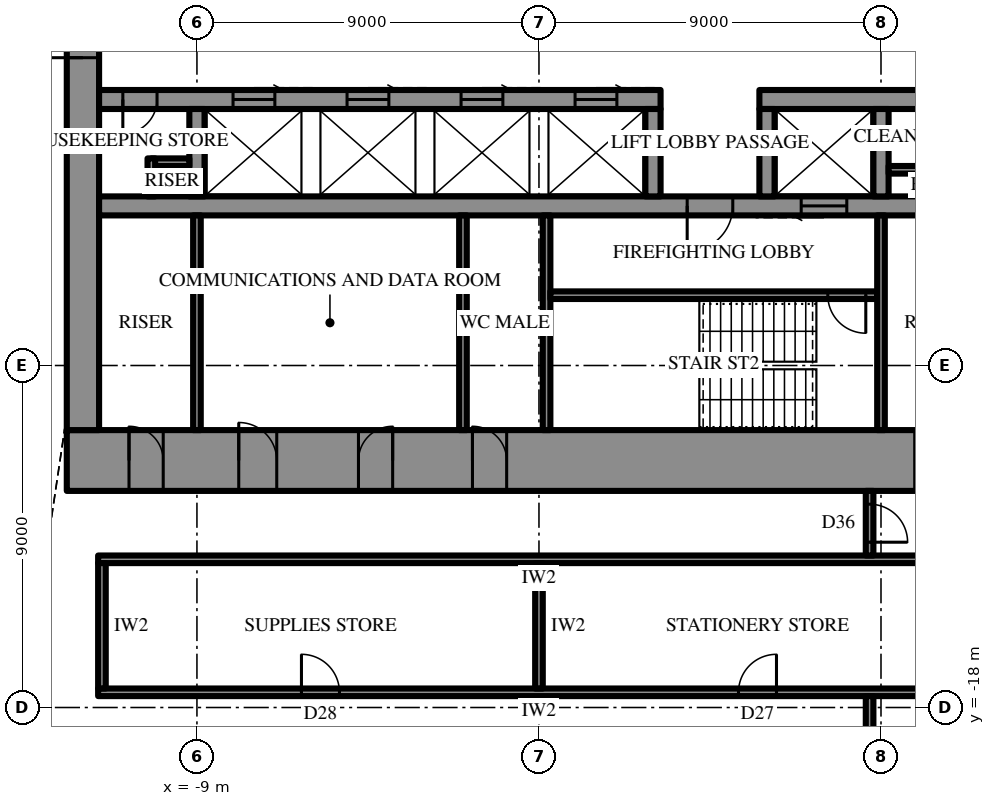
"""IFC4 building model, lengths in metres.
Left out: names, types, materials, properties, quantities, classifications, styles, units other than length and angle.
Written with IfcOpenShell. Run it as: python <this file> out.ifc"""

import sys

from ifc_helpers import new_model, si_unit, direction, frame, frame_2d, origin, place, context, subcontext, project, spatial, rectangle, extrude, element, fill, save


model = new_model("IFC4")
c1 = context("Model", 3, precision=1e-05, world=origin(), true_north=direction((0.0, 1.0)))
c2 = subcontext(c1, "Body", "Model", "MODEL_VIEW")
j1 = project(units=[si_unit("LENGTHUNIT", "METRE"), si_unit("PLANEANGLEUNIT", "RADIAN")], contexts=[c1])
p1 = place(None, origin())
s1 = spatial("IfcSite", under=j1, at=p1, CompositionType="ELEMENT")
p2 = place(p1, origin())
s2 = spatial("IfcBuilding", under=s1, at=p2, CompositionType="ELEMENT")
p3 = place(p2, frame((0.0, 0.0, 340.9)))
s3 = spatial("IfcBuildingStorey", under=s2, at=p3, CompositionType="ELEMENT", Elevation=340.9)
p4 = place(p3, frame((12.425, -11.5, 0.0), z_axis=(0.0, 0.0, 1.0), x_axis=(-1.0, 0.0, 0.0)))
e1 = element("IfcWall", 1, at=p4, inside=s3, PredefinedType="SHEAR", context=c2, shape_type="SweptSolid", body=[
    extrude(rectangle(XDim=24.85, YDim=1.6, at=frame_2d((12.425, 0.0))), origin(), (0.0, 0.0, 1.0), 4.2),
])
p5 = place(p4, frame((13.275, 0.0, 0.0)))
e2 = element("IfcOpeningElement", 2, at=p5, cuts=e1, PredefinedType="OPENING", context=c2, shape_type="SweptSolid", body=[
    extrude(rectangle(XDim=0.9, YDim=2.2, at=frame_2d((0.45, 1.1))), frame((0.0, 0.81, 0.0), z_axis=(0.0, -1.0, 0.0), x_axis=(1.0, 0.0, 0.0)), (0.0, 0.0, 1.0), 1.62),
])
p6 = place(p4, frame((16.275, 0.0, 0.0)))
e3 = element("IfcOpeningElement", 3, at=p6, cuts=e1, PredefinedType="OPENING", context=c2, shape_type="SweptSolid", body=[
    extrude(rectangle(XDim=0.9, YDim=2.2, at=frame_2d((0.45, 1.1))), frame((0.0, 0.81, 0.0), z_axis=(0.0, -1.0, 0.0), x_axis=(1.0, 0.0, 0.0)), (0.0, 0.0, 1.0), 1.62),
])
p7 = place(p4, frame((19.325, 0.0, 0.0)))
e4 = element("IfcOpeningElement", 4, at=p7, cuts=e1, PredefinedType="OPENING", context=c2, shape_type="SweptSolid", body=[
    extrude(rectangle(XDim=1.0, YDim=2.2, at=frame_2d((0.5, 1.1))), frame((0.0, 0.81, 0.0), z_axis=(0.0, -1.0, 0.0), x_axis=(1.0, 0.0, 0.0)), (0.0, 0.0, 1.0), 1.62),
])
p8 = place(p4, frame((1.637, 0.0, 0.0)))
e5 = element("IfcOpeningElement", 5, at=p8, cuts=e1, PredefinedType="OPENING", context=c2, shape_type="SweptSolid", body=[
    extrude(rectangle(XDim=0.9, YDim=2.2, at=frame_2d((0.45, 1.1))), frame((0.0, 0.81, 0.0), z_axis=(0.0, -1.0, 0.0), x_axis=(1.0, 0.0, 0.0)), (0.0, 0.0, 1.0), 1.62),
])
p9 = place(p4, frame((22.312, 0.0, 0.0)))
e6 = element("IfcOpeningElement", 6, at=p9, cuts=e1, PredefinedType="OPENING", context=c2, shape_type="SweptSolid", body=[
    extrude(rectangle(XDim=0.9, YDim=2.2, at=frame_2d((0.45, 1.1))), frame((0.0, 0.81, 0.0), z_axis=(0.0, -1.0, 0.0), x_axis=(1.0, 0.0, 0.0)), (0.0, 0.0, 1.0), 1.62),
])
p10 = place(p3, frame((-12.0, 10.7, 0.0), z_axis=(0.0, 0.0, 1.0), x_axis=(0.0, -1.0, 0.0)))
e7 = element("IfcWall", 7, at=p10, inside=s3, PredefinedType="SHEAR", context=c2, shape_type="SweptSolid", body=[
    extrude(rectangle(XDim=21.4, YDim=0.85, at=frame_2d((10.7, 0.0))), origin(), (0.0, 0.0, 1.0), 4.2),
])
p11 = place(p10, frame((9.8, 0.0, 0.0)))
e8 = element("IfcOpeningElement", 8, at=p11, cuts=e7, PredefinedType="OPENING", context=c2, shape_type="SweptSolid", body=[
    extrude(rectangle(XDim=1.8, YDim=2.4, at=frame_2d((0.9, 1.2))), frame((0.0, 0.435, 0.0), z_axis=(0.0, -1.0, 0.0), x_axis=(1.0, 0.0, 0.0)), (0.0, 0.0, 1.0), 0.87),
])
p12 = place(p3, frame((11.575, -2.0, 0.0), z_axis=(0.0, 0.0, 1.0), x_axis=(-1.0, 0.0, 0.0)))
e9 = element("IfcWall", 9, at=p12, inside=s3, PredefinedType="SHEAR", context=c2, shape_type="SweptSolid", body=[
    extrude(rectangle(XDim=5.775, YDim=0.5, at=frame_2d((2.887, 0.0))), origin(), (0.0, 0.0, 1.0), 4.2),
])
p13 = place(p12, frame((0.625, 0.0, 0.0)))
e10 = element("IfcOpeningElement", 10, at=p13, cuts=e9, PredefinedType="OPENING", context=c2, shape_type="SweptSolid", body=[
    extrude(rectangle(XDim=0.9, YDim=2.2, at=frame_2d((0.45, 1.1))), frame((0.0, 0.26, 0.0), z_axis=(0.0, -1.0, 0.0), x_axis=(1.0, 0.0, 0.0)), (0.0, 0.0, 1.0), 0.52),
])
p14 = place(p3, frame((3.2, -2.0, 0.0), z_axis=(0.0, 0.0, 1.0), x_axis=(-1.0, 0.0, 0.0)))
e11 = element("IfcWall", 11, at=p14, inside=s3, PredefinedType="SHEAR", context=c2, shape_type="SweptSolid", body=[
    extrude(rectangle(XDim=14.775, YDim=0.5, at=frame_2d((7.387, 0.0))), origin(), (0.0, 0.0, 1.0), 4.2),
])
p15 = place(p14, frame((13.25, 0.0, 0.0)))
e12 = element("IfcOpeningElement", 12, at=p15, cuts=e11, PredefinedType="OPENING", context=c2, shape_type="SweptSolid", body=[
    extrude(rectangle(XDim=0.9, YDim=2.2, at=frame_2d((0.45, 1.1))), frame((0.0, 0.26, 0.0), z_axis=(0.0, -1.0, 0.0), x_axis=(1.0, 0.0, 0.0)), (0.0, 0.0, 1.0), 0.52),
])
p16 = place(p14, frame((1.15, 0.0, 0.0)))
e13 = element("IfcOpeningElement", 13, at=p16, cuts=e11, PredefinedType="OPENING", context=c2, shape_type="SweptSolid", body=[
    extrude(rectangle(XDim=1.1, YDim=2.2, at=frame_2d((0.55, 1.1))), frame((0.0, 0.26, 0.0), z_axis=(0.0, -1.0, 0.0), x_axis=(1.0, 0.0, 0.0)), (0.0, 0.0, 1.0), 0.52),
])
p17 = place(p14, frame((4.15, 0.0, 0.0)))
e14 = element("IfcOpeningElement", 14, at=p17, cuts=e11, PredefinedType="OPENING", context=c2, shape_type="SweptSolid", body=[
    extrude(rectangle(XDim=1.1, YDim=2.2, at=frame_2d((0.55, 1.1))), frame((0.0, 0.26, 0.0), z_axis=(0.0, -1.0, 0.0), x_axis=(1.0, 0.0, 0.0)), (0.0, 0.0, 1.0), 0.52),
])
p18 = place(p14, frame((7.15, 0.0, 0.0)))
e15 = element("IfcOpeningElement", 15, at=p18, cuts=e11, PredefinedType="OPENING", context=c2, shape_type="SweptSolid", body=[
    extrude(rectangle(XDim=1.1, YDim=2.2, at=frame_2d((0.55, 1.1))), frame((0.0, 0.26, 0.0), z_axis=(0.0, -1.0, 0.0), x_axis=(1.0, 0.0, 0.0)), (0.0, 0.0, 1.0), 0.52),
])
p19 = place(p14, frame((10.15, 0.0, 0.0)))
e16 = element("IfcOpeningElement", 16, at=p19, cuts=e11, PredefinedType="OPENING", context=c2, shape_type="SweptSolid", body=[
    extrude(rectangle(XDim=1.1, YDim=2.2, at=frame_2d((0.55, 1.1))), frame((0.0, 0.26, 0.0), z_axis=(0.0, -1.0, 0.0), x_axis=(1.0, 0.0, 0.0)), (0.0, 0.0, 1.0), 0.52),
])
p20 = place(p3, frame((11.575, -4.8, 0.0), z_axis=(0.0, 0.0, 1.0), x_axis=(-1.0, 0.0, 0.0)))
e17 = element("IfcWall", 17, at=p20, inside=s3, PredefinedType="SHEAR", context=c2, shape_type="SweptSolid", body=[
    extrude(rectangle(XDim=23.15, YDim=0.5, at=frame_2d((11.575, 0.0))), origin(), (0.0, 0.0, 1.0), 4.2),
])
p21 = place(p20, frame((6.475, 0.0, 0.0)))
e18 = element("IfcOpeningElement", 18, at=p21, cuts=e17, PredefinedType="OPENING", context=c2, shape_type="SweptSolid", body=[
    extrude(rectangle(XDim=1.2, YDim=2.2, at=frame_2d((0.6, 1.1))), frame((0.0, 0.26, 0.0), z_axis=(0.0, -1.0, 0.0), x_axis=(1.0, 0.0, 0.0)), (0.0, 0.0, 1.0), 0.52),
])
p22 = place(p20, frame((3.475, 0.0, 0.0)))
e19 = element("IfcOpeningElement", 19, at=p22, cuts=e17, PredefinedType="OPENING", context=c2, shape_type="SweptSolid", body=[
    extrude(rectangle(XDim=1.2, YDim=2.2, at=frame_2d((0.6, 1.1))), frame((0.0, 0.26, 0.0), z_axis=(0.0, -1.0, 0.0), x_axis=(1.0, 0.0, 0.0)), (0.0, 0.0, 1.0), 0.52),
])
for number, where, z_axis, x_axis in (
    (20, (9.0, -2.25, 0.0), (0.0, 0.0, 1.0), (0.0, -1.0, 0.0)),
    (21, (6.0, -2.25, 0.0), (0.0, 0.0, 1.0), (0.0, -1.0, 0.0)),
    (22, (3.0, -2.25, 0.0), (0.0, 0.0, 1.0), (0.0, -1.0, 0.0)),
    (23, (-9.0, -2.25, 0.0), (0.0, 0.0, 1.0), (0.0, -1.0, 0.0)),
):
    element("IfcWall", number, at=place(p3, frame(where, z_axis=z_axis, x_axis=x_axis)), inside=s3, PredefinedType="SHEAR", context=c2, shape_type="SweptSolid", body=[
        extrude(rectangle(XDim=2.3, YDim=0.4, at=frame_2d((1.15, 0.0))), origin(), (0.0, 0.0, 1.0), 4.2),
    ])
p23 = place(p3, frame((0.2, -5.05, 0.0), z_axis=(0.0, 0.0, 1.0), x_axis=(0.0, -1.0, 0.0)))
e24 = element("IfcWall", 24, at=p23, inside=s3, PredefinedType="SHEAR", context=c2, shape_type="SweptSolid", body=[
    extrude(rectangle(XDim=5.65, YDim=0.2, at=frame_2d((2.825, 0.0))), origin(), (0.0, 0.0, 1.0), 4.2),
])
p24 = place(p3, frame((8.9, -7.15, 0.0), z_axis=(0.0, 0.0, 1.0), x_axis=(-1.0, 0.0, 0.0)))
e25 = element("IfcWall", 25, at=p24, inside=s3, PredefinedType="SHEAR", context=c2, shape_type="SweptSolid", body=[
    extrude(rectangle(XDim=8.6, YDim=0.2, at=frame_2d((4.3, 0.0))), origin(), (0.0, 0.0, 1.0), 4.2),
])
p25 = place(p24, frame((0.3, 0.0, 0.0)))
e26 = element("IfcOpeningElement", 26, at=p25, cuts=e25, PredefinedType="OPENING", context=c2, shape_type="SweptSolid", body=[
    extrude(rectangle(XDim=1.0, YDim=2.2, at=frame_2d((0.5, 1.1))), frame((0.0, 0.11, 0.0), z_axis=(0.0, -1.0, 0.0), x_axis=(1.0, 0.0, 0.0)), (0.0, 0.0, 1.0), 0.22),
])
for number, where, z_axis, x_axis in (
    (27, (9.0, -5.05, 0.0), (0.0, 0.0, 1.0), (0.0, -1.0, 0.0)),
    (28, (-9.0, -5.05, 0.0), (0.0, 0.0, 1.0), (0.0, -1.0, 0.0)),
    (29, (-2.0, -5.05, 0.0), (0.0, 0.0, 1.0), (0.0, -1.0, 0.0)),
):
    element("IfcWall", number, at=place(p3, frame(where, z_axis=z_axis, x_axis=x_axis)), inside=s3, PredefinedType="PARTITIONING", context=c2, shape_type="SweptSolid", body=[
        extrude(rectangle(XDim=5.65, YDim=0.2, at=frame_2d((2.825, 0.0))), origin(), (0.0, 0.0, 1.0), 4.0),
    ])
p26 = place(p3, frame((11.8, -3.85, 0.0), z_axis=(0.0, 0.0, 1.0), x_axis=(-1.0, 0.0, 0.0)))
e30 = element("IfcWall", 30, at=p26, inside=s3, PredefinedType="PARTITIONING", context=c2, shape_type="SweptSolid", body=[
    extrude(rectangle(XDim=2.6, YDim=0.2, at=frame_2d((1.3, 0.0))), origin(), (0.0, 0.0, 1.0), 4.0),
])
for number, where, z_axis, x_axis in (
    (31, (-9.2, -3.65, 0.0), (0.0, 0.0, 1.0), (-1.0, 0.0, 0.0)),
    (32, (-10.2, -3.55, 0.0), (0.0, 0.0, 1.0), (0.0, -1.0, 0.0)),
):
    element("IfcWall", number, at=place(p3, frame(where, z_axis=z_axis, x_axis=x_axis)), inside=s3, PredefinedType="PARTITIONING", context=c2, shape_type="SweptSolid", body=[
        extrude(rectangle(XDim=1.0, YDim=0.2, at=frame_2d((0.5, 0.0))), origin(), (0.0, 0.0, 1.0), 4.0),
    ])
p27 = place(p3, frame((11.6, -14.1, 0.0), z_axis=(0.0, 0.0, 1.0), x_axis=(-1.0, 0.0, 0.0)))
e33 = element("IfcWall", 33, at=p27, inside=s3, PredefinedType="PARTITIONING", context=c2, shape_type="SweptSolid", body=[
    extrude(rectangle(XDim=23.2, YDim=0.2, at=frame_2d((11.6, 0.0))), origin(), (0.0, 0.0, 1.0), 4.0),
])
p28 = place(p3, frame((11.6, -17.6, 0.0), z_axis=(0.0, 0.0, 1.0), x_axis=(-1.0, 0.0, 0.0)))
e34 = element("IfcWall", 34, at=p28, inside=s3, PredefinedType="PARTITIONING", context=c2, shape_type="SweptSolid", body=[
    extrude(rectangle(XDim=23.2, YDim=0.2, at=frame_2d((11.6, 0.0))), origin(), (0.0, 0.0, 1.0), 4.0),
])
p29 = place(p28, frame((5.35, 0.0, 0.0)))
e35 = element("IfcOpeningElement", 35, at=p29, cuts=e34, PredefinedType="OPENING", context=c2, shape_type="SweptSolid", body=[
    extrude(rectangle(XDim=1.0, YDim=2.2, at=frame_2d((0.5, 1.1))), frame((0.0, 0.11, 0.0), z_axis=(0.0, -1.0, 0.0), x_axis=(1.0, 0.0, 0.0)), (0.0, 0.0, 1.0), 0.22),
])
p30 = place(p28, frame((16.85, 0.0, 0.0)))
e36 = element("IfcOpeningElement", 36, at=p30, cuts=e34, PredefinedType="OPENING", context=c2, shape_type="SweptSolid", body=[
    extrude(rectangle(XDim=1.0, YDim=2.2, at=frame_2d((0.5, 1.1))), frame((0.0, 0.11, 0.0), z_axis=(0.0, -1.0, 0.0), x_axis=(1.0, 0.0, 0.0)), (0.0, 0.0, 1.0), 0.22),
])
p31 = place(p3, frame((0.0, -14.2, 0.0), z_axis=(0.0, 0.0, 1.0), x_axis=(0.0, -1.0, 0.0)))
e37 = element("IfcWall", 37, at=p31, inside=s3, PredefinedType="PARTITIONING", context=c2, shape_type="SweptSolid", body=[
    extrude(rectangle(XDim=3.3, YDim=0.2, at=frame_2d((1.65, 0.0))), origin(), (0.0, 0.0, 1.0), 2.992),
])
p32 = place(p3, frame((-11.5, -14.2, 0.0), z_axis=(0.0, 0.0, 1.0), x_axis=(0.0, -1.0, 0.0)))
e38 = element("IfcWall", 38, at=p32, inside=s3, PredefinedType="PARTITIONING", context=c2, shape_type="SweptSolid", body=[
    extrude(rectangle(XDim=3.3, YDim=0.2, at=frame_2d((1.65, 0.0))), origin(), (0.0, 0.0, 1.0), 4.0),
])
p33 = place(p3, frame((8.7, -12.3, 0.0), z_axis=(0.0, 0.0, 1.0), x_axis=(0.0, -1.0, 0.0)))
e39 = element("IfcWall", 39, at=p33, inside=s3, PredefinedType="PARTITIONING", context=c2, shape_type="SweptSolid", body=[
    extrude(rectangle(XDim=1.7, YDim=0.2, at=frame_2d((0.85, 0.0))), origin(), (0.0, 0.0, 1.0), 2.992),
])
p34 = place(p33, frame((0.35, 0.0, 0.0)))
e40 = element("IfcOpeningElement", 40, at=p34, cuts=e39, PredefinedType="OPENING", context=c2, shape_type="SweptSolid", body=[
    extrude(rectangle(XDim=1.0, YDim=2.2, at=frame_2d((0.5, 1.1))), frame((0.0, 0.11, 0.0), z_axis=(0.0, -1.0, 0.0), x_axis=(1.0, 0.0, 0.0)), (0.0, 0.0, 1.0), 0.22),
])
p35 = place(p3, frame((8.7, -17.7, 0.0), z_axis=(0.0, 0.0, 1.0), x_axis=(0.0, -1.0, 0.0)))
e41 = element("IfcWall", 41, at=p35, inside=s3, PredefinedType="PARTITIONING", context=c2, shape_type="SweptSolid", body=[
    extrude(rectangle(XDim=8.15, YDim=0.2, at=frame_2d((4.075, 0.0))), origin(), (0.0, 0.0, 1.0), 2.992),
])
p36 = place(p11, frame((1.8, 0.0, 0.0), z_axis=(0.0, 0.0, 1.0), x_axis=(-1.0, 0.0, 0.0)))
e42 = element("IfcDoor", 42, at=p36, inside=s3, OperationType="DOUBLE_DOOR_SINGLE_SWING", PredefinedType="DOOR", context=c2, shape_type="SweptSolid", body=[
    extrude(rectangle(XDim=1.8, YDim=2.4, at=frame_2d((0.9, 1.2))), frame((0.0, 0.025, 0.0), z_axis=(0.0, -1.0, 0.0), x_axis=(1.0, 0.0, 0.0)), (0.0, 0.0, 1.0), 0.05),
])
fill(e8, e42)
p37 = place(p21, origin())
e43 = element("IfcDoor", 43, at=p37, inside=s3, OperationType="SINGLE_SWING_LEFT", PredefinedType="DOOR", context=c2, shape_type="SweptSolid", body=[
    extrude(rectangle(XDim=1.2, YDim=2.2, at=frame_2d((0.6, 1.1))), frame((0.0, 0.025, 0.0), z_axis=(0.0, -1.0, 0.0), x_axis=(1.0, 0.0, 0.0)), (0.0, 0.0, 1.0), 0.05),
])
fill(e18, e43)
p38 = place(p25, origin())
e44 = element("IfcDoor", 44, at=p38, inside=s3, OperationType="SINGLE_SWING_RIGHT", PredefinedType="DOOR", context=c2, shape_type="SweptSolid", body=[
    extrude(rectangle(XDim=1.0, YDim=2.2, at=frame_2d((0.5, 1.1))), frame((0.0, 0.025, 0.0), z_axis=(0.0, -1.0, 0.0), x_axis=(1.0, 0.0, 0.0)), (0.0, 0.0, 1.0), 0.05),
])
fill(e26, e44)
p39 = place(p5, frame((0.9, 0.0, 0.0), z_axis=(0.0, 0.0, 1.0), x_axis=(-1.0, 0.0, 0.0)))
e45 = element("IfcDoor", 45, at=p39, inside=s3, OperationType="SINGLE_SWING_RIGHT", PredefinedType="DOOR", context=c2, shape_type="SweptSolid", body=[
    extrude(rectangle(XDim=0.9, YDim=2.2, at=frame_2d((0.45, 1.1))), frame((0.0, 0.025, 0.0), z_axis=(0.0, -1.0, 0.0), x_axis=(1.0, 0.0, 0.0)), (0.0, 0.0, 1.0), 0.05),
])
fill(e2, e45)
p40 = place(p6, frame((0.9, 0.0, 0.0), z_axis=(0.0, 0.0, 1.0), x_axis=(-1.0, 0.0, 0.0)))
e46 = element("IfcDoor", 46, at=p40, inside=s3, OperationType="SINGLE_SWING_LEFT", PredefinedType="DOOR", context=c2, shape_type="SweptSolid", body=[
    extrude(rectangle(XDim=0.9, YDim=2.2, at=frame_2d((0.45, 1.1))), frame((0.0, 0.025, 0.0), z_axis=(0.0, -1.0, 0.0), x_axis=(1.0, 0.0, 0.0)), (0.0, 0.0, 1.0), 0.05),
])
fill(e3, e46)
p41 = place(p7, frame((1.0, 0.0, 0.0), z_axis=(0.0, 0.0, 1.0), x_axis=(-1.0, 0.0, 0.0)))
e47 = element("IfcDoor", 47, at=p41, inside=s3, OperationType="SINGLE_SWING_RIGHT", PredefinedType="DOOR", context=c2, shape_type="SweptSolid", body=[
    extrude(rectangle(XDim=1.0, YDim=2.2, at=frame_2d((0.5, 1.1))), frame((0.0, 0.025, 0.0), z_axis=(0.0, -1.0, 0.0), x_axis=(1.0, 0.0, 0.0)), (0.0, 0.0, 1.0), 0.05),
])
fill(e4, e47)
p42 = place(p8, frame((0.9, 0.0, 0.0), z_axis=(0.0, 0.0, 1.0), x_axis=(-1.0, 0.0, 0.0)))
e48 = element("IfcDoor", 48, at=p42, inside=s3, OperationType="SINGLE_SWING_LEFT", PredefinedType="DOOR", context=c2, shape_type="SweptSolid", body=[
    extrude(rectangle(XDim=0.9, YDim=2.2, at=frame_2d((0.45, 1.1))), frame((0.0, 0.025, 0.0), z_axis=(0.0, -1.0, 0.0), x_axis=(1.0, 0.0, 0.0)), (0.0, 0.0, 1.0), 0.05),
])
fill(e5, e48)
p43 = place(p9, frame((0.9, 0.0, 0.0), z_axis=(0.0, 0.0, 1.0), x_axis=(-1.0, 0.0, 0.0)))
e49 = element("IfcDoor", 49, at=p43, inside=s3, OperationType="SINGLE_SWING_RIGHT", PredefinedType="DOOR", context=c2, shape_type="SweptSolid", body=[
    extrude(rectangle(XDim=0.9, YDim=2.2, at=frame_2d((0.45, 1.1))), frame((0.0, 0.025, 0.0), z_axis=(0.0, -1.0, 0.0), x_axis=(1.0, 0.0, 0.0)), (0.0, 0.0, 1.0), 0.05),
])
fill(e6, e49)
p44 = place(p15, origin())
e50 = element("IfcDoor", 50, at=p44, inside=s3, OperationType="SINGLE_SWING_LEFT", PredefinedType="DOOR", context=c2, shape_type="SweptSolid", body=[
    extrude(rectangle(XDim=0.9, YDim=2.2, at=frame_2d((0.45, 1.1))), frame((0.0, 0.025, 0.0), z_axis=(0.0, -1.0, 0.0), x_axis=(1.0, 0.0, 0.0)), (0.0, 0.0, 1.0), 0.05),
])
fill(e12, e50)
p45 = place(p22, origin())
e51 = element("IfcDoor", 51, at=p45, inside=s3, OperationType="SLIDING_TO_LEFT", PredefinedType="DOOR", context=c2, shape_type="SweptSolid", body=[
    extrude(rectangle(XDim=1.2, YDim=2.2, at=frame_2d((0.6, 1.1))), frame((0.0, 0.025, 0.0), z_axis=(0.0, -1.0, 0.0), x_axis=(1.0, 0.0, 0.0)), (0.0, 0.0, 1.0), 0.05),
])
fill(e19, e51)
p46 = place(p16, frame((1.1, 0.0, 0.0), z_axis=(0.0, 0.0, 1.0), x_axis=(-1.0, 0.0, 0.0)))
e52 = element("IfcDoor", 52, at=p46, inside=s3, OperationType="SLIDING_TO_LEFT", PredefinedType="DOOR", context=c2, shape_type="SweptSolid", body=[
    extrude(rectangle(XDim=1.1, YDim=2.2, at=frame_2d((0.55, 1.1))), frame((0.0, 0.025, 0.0), z_axis=(0.0, -1.0, 0.0), x_axis=(1.0, 0.0, 0.0)), (0.0, 0.0, 1.0), 0.05),
])
fill(e13, e52)
p47 = place(p17, frame((1.1, 0.0, 0.0), z_axis=(0.0, 0.0, 1.0), x_axis=(-1.0, 0.0, 0.0)))
e53 = element("IfcDoor", 53, at=p47, inside=s3, OperationType="SLIDING_TO_LEFT", PredefinedType="DOOR", context=c2, shape_type="SweptSolid", body=[
    extrude(rectangle(XDim=1.1, YDim=2.2, at=frame_2d((0.55, 1.1))), frame((0.0, 0.025, 0.0), z_axis=(0.0, -1.0, 0.0), x_axis=(1.0, 0.0, 0.0)), (0.0, 0.0, 1.0), 0.05),
])
fill(e14, e53)
p48 = place(p18, frame((1.1, 0.0, 0.0), z_axis=(0.0, 0.0, 1.0), x_axis=(-1.0, 0.0, 0.0)))
e54 = element("IfcDoor", 54, at=p48, inside=s3, OperationType="SLIDING_TO_LEFT", PredefinedType="DOOR", context=c2, shape_type="SweptSolid", body=[
    extrude(rectangle(XDim=1.1, YDim=2.2, at=frame_2d((0.55, 1.1))), frame((0.0, 0.025, 0.0), z_axis=(0.0, -1.0, 0.0), x_axis=(1.0, 0.0, 0.0)), (0.0, 0.0, 1.0), 0.05),
])
fill(e15, e54)
p49 = place(p19, frame((1.1, 0.0, 0.0), z_axis=(0.0, 0.0, 1.0), x_axis=(-1.0, 0.0, 0.0)))
e55 = element("IfcDoor", 55, at=p49, inside=s3, OperationType="SLIDING_TO_LEFT", PredefinedType="DOOR", context=c2, shape_type="SweptSolid", body=[
    extrude(rectangle(XDim=1.1, YDim=2.2, at=frame_2d((0.55, 1.1))), frame((0.0, 0.025, 0.0), z_axis=(0.0, -1.0, 0.0), x_axis=(1.0, 0.0, 0.0)), (0.0, 0.0, 1.0), 0.05),
])
fill(e16, e55)
p50 = place(p29, frame((1.0, 0.0, 0.0), z_axis=(0.0, 0.0, 1.0), x_axis=(-1.0, 0.0, 0.0)))
e56 = element("IfcDoor", 56, at=p50, inside=s3, OperationType="SINGLE_SWING_LEFT", PredefinedType="DOOR", context=c2, shape_type="SweptSolid", body=[
    extrude(rectangle(XDim=1.0, YDim=2.2, at=frame_2d((0.5, 1.1))), frame((0.0, 0.025, 0.0), z_axis=(0.0, -1.0, 0.0), x_axis=(1.0, 0.0, 0.0)), (0.0, 0.0, 1.0), 0.05),
])
fill(e35, e56)
p51 = place(p30, frame((1.0, 0.0, 0.0), z_axis=(0.0, 0.0, 1.0), x_axis=(-1.0, 0.0, 0.0)))
e57 = element("IfcDoor", 57, at=p51, inside=s3, OperationType="SINGLE_SWING_RIGHT", PredefinedType="DOOR", context=c2, shape_type="SweptSolid", body=[
    extrude(rectangle(XDim=1.0, YDim=2.2, at=frame_2d((0.5, 1.1))), frame((0.0, 0.025, 0.0), z_axis=(0.0, -1.0, 0.0), x_axis=(1.0, 0.0, 0.0)), (0.0, 0.0, 1.0), 0.05),
])
fill(e36, e57)
p52 = place(p34, origin())
e58 = element("IfcDoor", 58, at=p52, inside=s3, OperationType="SINGLE_SWING_LEFT", PredefinedType="DOOR", context=c2, shape_type="SweptSolid", body=[
    extrude(rectangle(XDim=1.0, YDim=2.2, at=frame_2d((0.5, 1.1))), frame((0.0, 0.025, 0.0), z_axis=(0.0, -1.0, 0.0), x_axis=(1.0, 0.0, 0.0)), (0.0, 0.0, 1.0), 0.05),
])
fill(e40, e58)
save(model, sys.argv[1])
